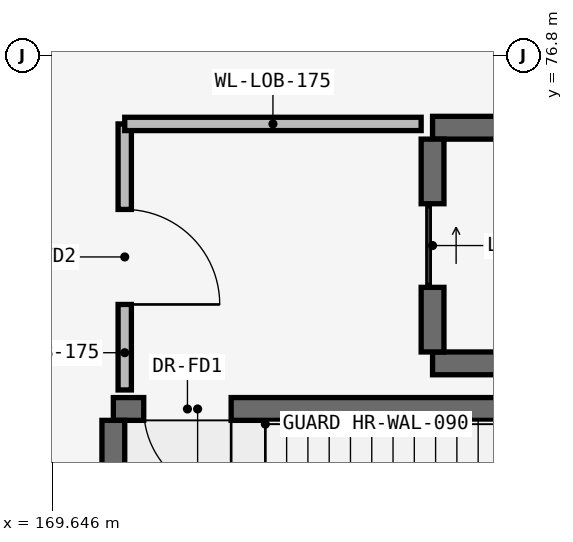
"""IFC4 building model, lengths in metres.
Left out: names, types, materials, properties, quantities, classifications, styles, units other than length and angle.
Written with IfcOpenShell. Run it as: python <this file> out.ifc"""

import sys

from ifc_helpers import new_model, si_unit, direction, frame, frame_2d, origin, place, context, subcontext, project, spatial, rectangle, extrude, element, fill, save


model = new_model("IFC4")
c1 = context("Model", 3, precision=1e-05, world=origin(), true_north=direction((0.0, 1.0)))
c2 = subcontext(c1, "Body", "Model", "MODEL_VIEW")
j1 = project(units=[si_unit("LENGTHUNIT", "METRE"), si_unit("PLANEANGLEUNIT", "RADIAN")], contexts=[c1])
p1 = place(None, origin())
s1 = spatial("IfcSite", under=j1, at=p1, CompositionType="ELEMENT")
p2 = place(p1, origin())
s2 = spatial("IfcBuilding", under=s1, at=p2, CompositionType="ELEMENT")
p3 = place(p2, frame((0.0, 0.0, -4.5)))
s3 = spatial("IfcBuildingStorey", under=s2, at=p3, CompositionType="ELEMENT", Elevation=-4.5)
p4 = place(p3, frame((170.45, 72.15, 0.0), z_axis=(0.0, 0.0, 1.0), x_axis=(1.0, 0.0, 0.0)))
e1 = element("IfcWall", 1, at=p4, inside=s3, PredefinedType="SHEAR", context=c2, shape_type="SweptSolid", body=[
    extrude(rectangle(XDim=7.92, YDim=0.3, at=frame_2d((3.96, 0.0))), origin(), (0.0, 0.0, 1.0), 4.15),
])
p5 = place(p4, frame((0.4, 0.0, 0.0)))
e2 = element("IfcOpeningElement", 2, at=p5, cuts=e1, PredefinedType="OPENING", context=c2, shape_type="SweptSolid", body=[
    extrude(rectangle(XDim=1.15, YDim=2.15, at=frame_2d((0.575, 1.075))), frame((0.0, 0.165, 0.0), z_axis=(0.0, -1.0, 0.0), x_axis=(1.0, 0.0, 0.0)), (0.0, 0.0, 1.0), 0.33),
])
p6 = place(p3, frame((170.45, 68.1, 0.0), z_axis=(0.0, 0.0, 1.0), x_axis=(0.0, 1.0, 0.0)))
e3 = element("IfcWall", 3, at=p6, inside=s3, PredefinedType="SHEAR", context=c2, shape_type="SweptSolid", body=[
    extrude(rectangle(XDim=3.9, YDim=0.3, at=frame_2d((1.95, 0.0))), origin(), (0.0, 0.0, 1.0), 4.15),
])
for number, where, z_axis, x_axis in (
    (4, (174.65, 72.75, 0.0), (0.0, 0.0, 1.0), (1.0, 0.0, 0.0)),
    (5, (174.65, 75.85, 0.0), (0.0, 0.0, 1.0), (1.0, 0.0, 0.0)),
):
    element("IfcWall", number, at=place(p3, frame(where, z_axis=z_axis, x_axis=x_axis)), inside=s3, PredefinedType="SHEAR", context=c2, shape_type="SweptSolid", body=[
        extrude(rectangle(XDim=3.1, YDim=0.3, at=frame_2d((1.55, 0.0))), origin(), (0.0, 0.0, 1.0), 4.15),
    ])
p7 = place(p3, frame((174.65, 72.9, 0.0), z_axis=(0.0, 0.0, 1.0), x_axis=(0.0, 1.0, 0.0)))
e6 = element("IfcWall", 6, at=p7, inside=s3, PredefinedType="SHEAR", context=c2, shape_type="SweptSolid", body=[
    extrude(rectangle(XDim=2.8, YDim=0.3, at=frame_2d((1.4, 0.0))), origin(), (0.0, 0.0, 1.0), 4.15),
])
p8 = place(p7, frame((0.85, 0.0, 0.0)))
e7 = element("IfcOpeningElement", 7, at=p8, cuts=e6, PredefinedType="OPENING", context=c2, shape_type="SweptSolid", body=[
    extrude(rectangle(XDim=1.1, YDim=2.15, at=frame_2d((0.55, 1.075))), frame((0.0, 0.165, 0.0), z_axis=(0.0, -1.0, 0.0), x_axis=(1.0, 0.0, 0.0)), (0.0, 0.0, 1.0), 0.33),
])
p9 = place(p3, frame((170.6, 72.4, 0.0), z_axis=(0.0, 0.0, 1.0), x_axis=(0.0, 1.0, 0.0)))
e8 = element("IfcWall", 8, at=p9, inside=s3, PredefinedType="PARTITIONING", context=c2, shape_type="SweptSolid", body=[
    extrude(rectangle(XDim=3.5, YDim=0.175, at=frame_2d((1.75, 0.0))), origin(), (0.0, 0.0, 1.0), 4.15),
])
p10 = place(p9, frame((1.125, 0.0, 0.0)))
e9 = element("IfcOpeningElement", 9, at=p10, cuts=e8, PredefinedType="OPENING", context=c2, shape_type="SweptSolid", body=[
    extrude(rectangle(XDim=1.25, YDim=2.2, at=frame_2d((0.625, 1.1))), frame((0.0, 0.103, 0.0), z_axis=(0.0, -1.0, 0.0), x_axis=(1.0, 0.0, 0.0)), (0.0, 0.0, 1.0), 0.205),
])
p11 = place(p3, frame((170.6, 75.9, 0.0), z_axis=(0.0, 0.0, 1.0), x_axis=(1.0, 0.0, 0.0)))
e10 = element("IfcWall", 10, at=p11, inside=s3, PredefinedType="PARTITIONING", context=c2, shape_type="SweptSolid", body=[
    extrude(rectangle(XDim=3.9, YDim=0.175, at=frame_2d((1.95, 0.0))), origin(), (0.0, 0.0, 1.0), 4.15),
])
p12 = place(p5, frame((1.15, 0.0, 0.0), z_axis=(0.0, 0.0, 1.0), x_axis=(-1.0, 0.0, 0.0)))
e11 = element("IfcDoor", 11, at=p12, inside=s3, OperationType="SINGLE_SWING_RIGHT", PredefinedType="DOOR", context=c2, shape_type="SweptSolid", body=[
    extrude(rectangle(XDim=1.15, YDim=2.15, at=frame_2d((0.575, 1.075))), frame((0.0, 0.025, 0.0), z_axis=(0.0, -1.0, 0.0), x_axis=(1.0, 0.0, 0.0)), (0.0, 0.0, 1.0), 0.05),
])
fill(e2, e11)
p13 = place(p8, origin())
e12 = element("IfcDoor", 12, at=p13, inside=s3, OperationType="SLIDING_TO_LEFT", PredefinedType="DOOR", context=c2, shape_type="SweptSolid", body=[
    extrude(rectangle(XDim=1.1, YDim=2.15, at=frame_2d((0.55, 1.075))), frame((0.0, 0.025, 0.0), z_axis=(0.0, -1.0, 0.0), x_axis=(1.0, 0.0, 0.0)), (0.0, 0.0, 1.0), 0.05),
])
fill(e7, e12)
p14 = place(p10, frame((1.25, 0.0, 0.0), z_axis=(0.0, 0.0, 1.0), x_axis=(-1.0, 0.0, 0.0)))
e13 = element("IfcDoor", 13, at=p14, inside=s3, OperationType="SINGLE_SWING_LEFT", PredefinedType="DOOR", context=c2, shape_type="SweptSolid", body=[
    extrude(rectangle(XDim=1.25, YDim=2.2, at=frame_2d((0.625, 1.1))), frame((0.0, 0.025, 0.0), z_axis=(0.0, -1.0, 0.0), x_axis=(1.0, 0.0, 0.0)), (0.0, 0.0, 1.0), 0.05),
])
fill(e9, e13)
save(model, sys.argv[1])
